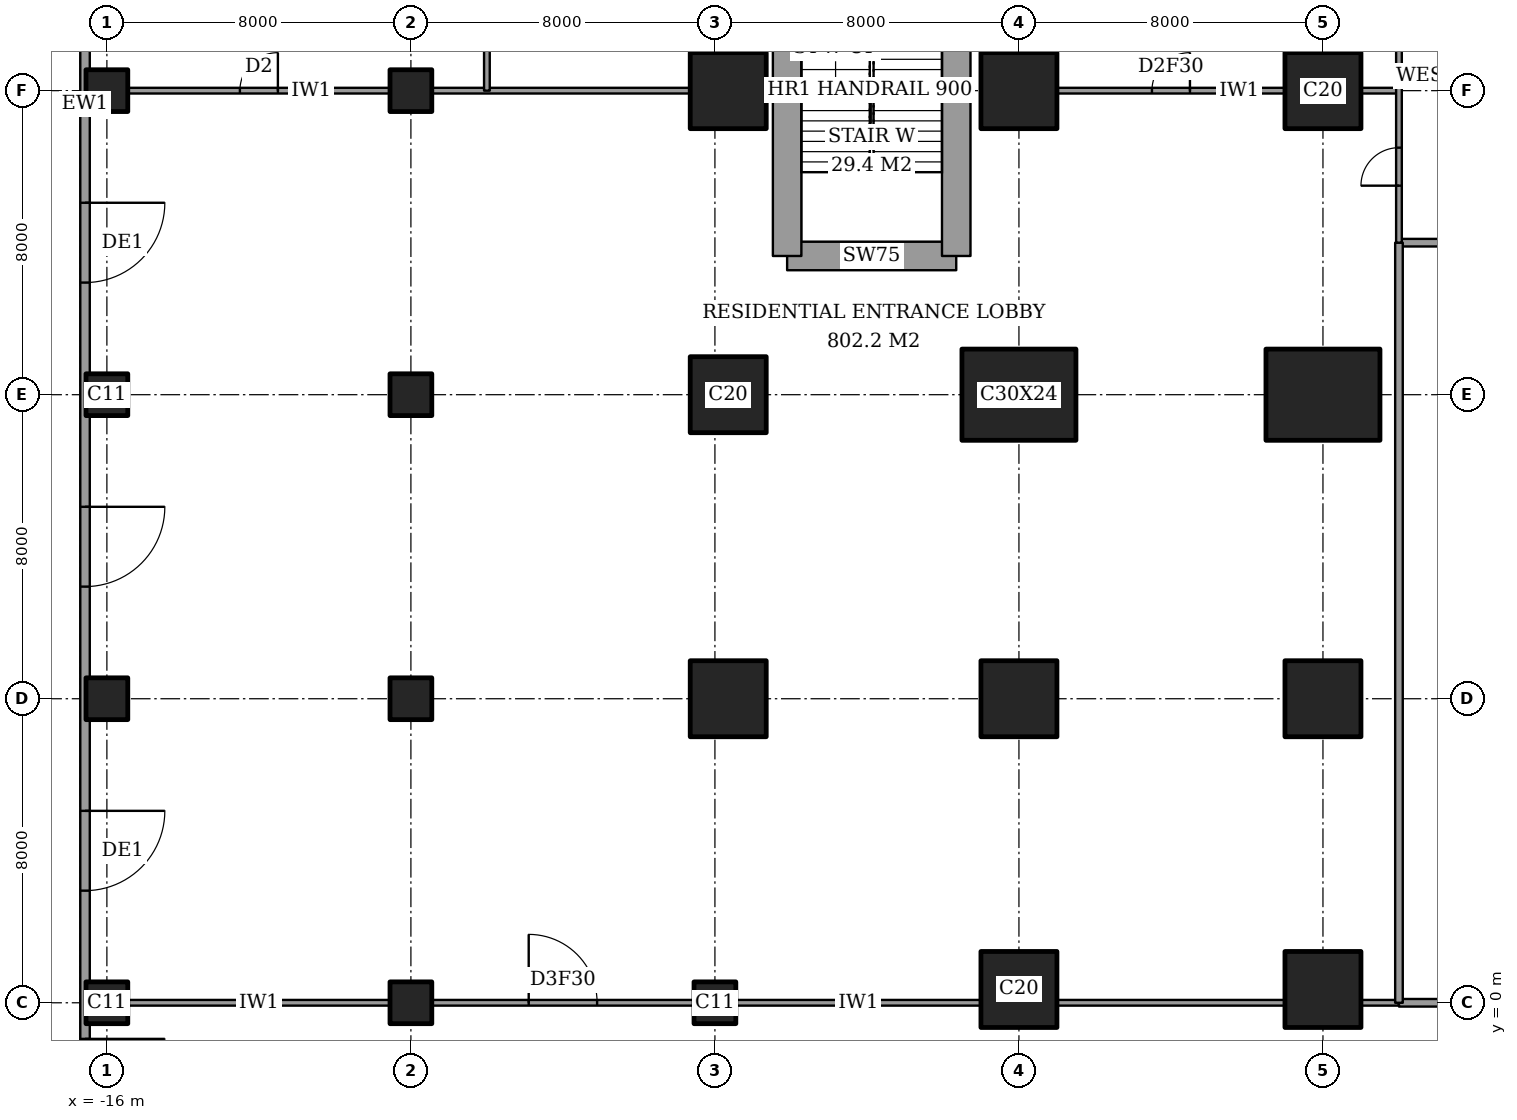
"""IFC4 building model, lengths in metres.
Left out: names, types, materials, properties, quantities, classifications, styles, units other than length and angle.
Written with IfcOpenShell. Run it as: python <this file> out.ifc"""

import sys

from ifc_helpers import new_model, si_unit, direction, frame, frame_2d, origin, origin_2d, place, context, subcontext, project, spatial, rectangle, extrude, element, fill, save


model = new_model("IFC4")
c1 = context("Model", 3, precision=1e-05, world=origin(), true_north=direction((0.0, 1.0)))
c2 = subcontext(c1, "Body", "Model", "MODEL_VIEW")
j1 = project(units=[si_unit("LENGTHUNIT", "METRE"), si_unit("PLANEANGLEUNIT", "RADIAN")], contexts=[c1])
p1 = place(None, origin())
s1 = spatial("IfcSite", under=j1, at=p1, CompositionType="ELEMENT")
p2 = place(p1, origin())
s2 = spatial("IfcBuilding", under=s1, at=p2, CompositionType="ELEMENT")
p3 = place(p2, origin())
s3 = spatial("IfcBuildingStorey", under=s2, at=p3, CompositionType="ELEMENT", Elevation=0.0)
for number, where, z_axis, x_axis in (
    (1, (-16.0, 0.0, 0.0), (0.0, 0.0, 1.0), (1.0, 0.0, 0.0)),
    (2, (-16.0, 8.0, 0.0), (0.0, 0.0, 1.0), (1.0, 0.0, 0.0)),
    (3, (-16.0, 16.0, 0.0), (0.0, 0.0, 1.0), (1.0, 0.0, 0.0)),
    (4, (-16.0, 24.0, 0.0), (0.0, 0.0, 1.0), (1.0, 0.0, 0.0)),
    (5, (-8.0, 0.0, 0.0), (0.0, 0.0, 1.0), (1.0, 0.0, 0.0)),
    (6, (-8.0, 8.0, 0.0), (0.0, 0.0, 1.0), (1.0, 0.0, 0.0)),
    (7, (-8.0, 16.0, 0.0), (0.0, 0.0, 1.0), (1.0, 0.0, 0.0)),
    (8, (-8.0, 24.0, 0.0), (0.0, 0.0, 1.0), (1.0, 0.0, 0.0)),
    (9, (0.0, 0.0, 0.0), (0.0, 0.0, 1.0), (1.0, 0.0, 0.0)),
):
    element("IfcColumn", number, at=place(p3, frame(where, z_axis=z_axis, x_axis=x_axis)), inside=s3, PredefinedType="COLUMN", context=c2, shape_type="SweptSolid", body=[
        extrude(rectangle(XDim=1.1, YDim=1.1, at=origin_2d()), origin(), (0.0, 0.0, 1.0), 6.0),
    ])
for number, where, z_axis, x_axis in (
    (10, (0.35, 8.0, 0.0), (0.0, 0.0, 1.0), (1.0, 0.0, 0.0)),
    (11, (0.35, 16.0, 0.0), (0.0, 0.0, 1.0), (1.0, 0.0, 0.0)),
    (12, (0.35, 24.0, 0.0), (0.0, 0.0, 1.0), (1.0, 0.0, 0.0)),
    (13, (8.0, 0.35, 0.0), (0.0, 0.0, 1.0), (1.0, 0.0, 0.0)),
    (14, (8.0, 8.0, 0.0), (0.0, 0.0, 1.0), (1.0, 0.0, 0.0)),
):
    element("IfcColumn", number, at=place(p3, frame(where, z_axis=z_axis, x_axis=x_axis)), inside=s3, PredefinedType="COLUMN", context=c2, shape_type="SweptSolid", body=[
        extrude(rectangle(XDim=2.0, YDim=2.0, at=origin_2d()), origin(), (0.0, 0.0, 1.0), 6.0),
    ])
p4 = place(p3, frame((8.0, 16.0, 0.0), z_axis=(0.0, 0.0, 1.0), x_axis=(1.0, 0.0, 0.0)))
e15 = element("IfcColumn", 15, at=p4, inside=s3, PredefinedType="COLUMN", context=c2, shape_type="SweptSolid", body=[
    extrude(rectangle(XDim=3.0, YDim=2.4, at=origin_2d()), origin(), (0.0, 0.0, 1.0), 6.0),
])
for number, where, z_axis, x_axis in (
    (16, (8.0, 24.0, 0.0), (0.0, 0.0, 1.0), (1.0, 0.0, 0.0)),
    (17, (16.0, 0.35, 0.0), (0.0, 0.0, 1.0), (1.0, 0.0, 0.0)),
    (18, (16.0, 8.0, 0.0), (0.0, 0.0, 1.0), (1.0, 0.0, 0.0)),
):
    element("IfcColumn", number, at=place(p3, frame(where, z_axis=z_axis, x_axis=x_axis)), inside=s3, PredefinedType="COLUMN", context=c2, shape_type="SweptSolid", body=[
        extrude(rectangle(XDim=2.0, YDim=2.0, at=origin_2d()), origin(), (0.0, 0.0, 1.0), 6.0),
    ])
p5 = place(p3, frame((16.0, 16.0, 0.0), z_axis=(0.0, 0.0, 1.0), x_axis=(1.0, 0.0, 0.0)))
e19 = element("IfcColumn", 19, at=p5, inside=s3, PredefinedType="COLUMN", context=c2, shape_type="SweptSolid", body=[
    extrude(rectangle(XDim=3.0, YDim=2.4, at=origin_2d()), origin(), (0.0, 0.0, 1.0), 6.0),
])
p6 = place(p3, frame((16.0, 24.0, 0.0), z_axis=(0.0, 0.0, 1.0), x_axis=(1.0, 0.0, 0.0)))
e20 = element("IfcColumn", 20, at=p6, inside=s3, PredefinedType="COLUMN", context=c2, shape_type="SweptSolid", body=[
    extrude(rectangle(XDim=2.0, YDim=2.0, at=origin_2d()), origin(), (0.0, 0.0, 1.0), 6.0),
])
p7 = place(p3, frame((1.9, 19.65, 0.0), z_axis=(0.0, 0.0, 1.0), x_axis=(1.0, 0.0, 0.0)))
e21 = element("IfcWall", 21, at=p7, inside=s3, PredefinedType="SHEAR", context=c2, shape_type="SweptSolid", body=[
    extrude(rectangle(XDim=4.45, YDim=0.75, at=frame_2d((2.225, 0.0))), origin(), (0.0, 0.0, 1.0), 6.0),
])
p8 = place(p3, frame((6.35, 19.65, 0.0), z_axis=(0.0, 0.0, 1.0), x_axis=(0.0, 1.0, 0.0)))
e22 = element("IfcWall", 22, at=p8, inside=s3, PredefinedType="SHEAR", context=c2, shape_type="SweptSolid", body=[
    extrude(rectangle(XDim=8.7, YDim=0.75, at=frame_2d((4.35, 0.0))), origin(), (0.0, 0.0, 1.0), 6.0),
])
p9 = place(p8, frame((6.575, 0.0, 0.0)))
e23 = element("IfcOpeningElement", 23, at=p9, cuts=e22, PredefinedType="OPENING", context=c2, shape_type="SweptSolid", body=[
    extrude(rectangle(XDim=1.7, YDim=2.1, at=frame_2d((0.85, 1.05))), frame((0.0, 0.385, 0.0), z_axis=(0.0, -1.0, 0.0), x_axis=(1.0, 0.0, 0.0)), (0.0, 0.0, 1.0), 0.77),
])
p10 = place(p3, frame((1.9, 28.35, 0.0), z_axis=(0.0, 0.0, 1.0), x_axis=(0.0, -1.0, 0.0)))
e24 = element("IfcWall", 24, at=p10, inside=s3, PredefinedType="SHEAR", context=c2, shape_type="SweptSolid", body=[
    extrude(rectangle(XDim=8.7, YDim=0.75, at=frame_2d((4.35, 0.0))), origin(), (0.0, 0.0, 1.0), 6.0),
])
p11 = place(p3, frame((-16.575, 56.575, 0.0), z_axis=(0.0, 0.0, 1.0), x_axis=(0.0, -1.0, 0.0)))
e25 = element("IfcWall", 25, at=p11, inside=s3, PredefinedType="SOLIDWALL", context=c2, shape_type="SweptSolid", body=[
    extrude(rectangle(XDim=73.15, YDim=0.25, at=frame_2d((36.575, 0.0))), origin(), (0.0, 0.0, 1.0), 6.0),
])
p12 = place(p11, frame((1.65, 0.0, 0.3)))
e26 = element("IfcOpeningElement", 26, at=p12, cuts=e25, PredefinedType="OPENING", context=c2, shape_type="SweptSolid", body=[
    extrude(rectangle(XDim=2.4, YDim=3.6, at=frame_2d((1.2, 1.8))), frame((0.0, 0.135, 0.0), z_axis=(0.0, -1.0, 0.0), x_axis=(1.0, 0.0, 0.0)), (0.0, 0.0, 1.0), 0.27),
])
p13 = place(p11, frame((5.1, 0.0, 0.3)))
e27 = element("IfcOpeningElement", 27, at=p13, cuts=e25, PredefinedType="OPENING", context=c2, shape_type="SweptSolid", body=[
    extrude(rectangle(XDim=2.4, YDim=3.6, at=frame_2d((1.2, 1.8))), frame((0.0, 0.135, 0.0), z_axis=(0.0, -1.0, 0.0), x_axis=(1.0, 0.0, 0.0)), (0.0, 0.0, 1.0), 0.27),
])
p14 = place(p11, frame((9.65, 0.0, 0.3)))
e28 = element("IfcOpeningElement", 28, at=p14, cuts=e25, PredefinedType="OPENING", context=c2, shape_type="SweptSolid", body=[
    extrude(rectangle(XDim=2.4, YDim=3.6, at=frame_2d((1.2, 1.8))), frame((0.0, 0.135, 0.0), z_axis=(0.0, -1.0, 0.0), x_axis=(1.0, 0.0, 0.0)), (0.0, 0.0, 1.0), 0.27),
])
p15 = place(p11, frame((19.525, 0.0, 0.0)))
e29 = element("IfcOpeningElement", 29, at=p15, cuts=e25, PredefinedType="OPENING", context=c2, shape_type="SweptSolid", body=[
    extrude(rectangle(XDim=2.1, YDim=2.4, at=frame_2d((1.05, 1.2))), frame((0.0, 0.135, 0.0), z_axis=(0.0, -1.0, 0.0), x_axis=(1.0, 0.0, 0.0)), (0.0, 0.0, 1.0), 0.27),
])
p16 = place(p11, frame((13.1, 0.0, 0.3)))
e30 = element("IfcOpeningElement", 30, at=p16, cuts=e25, PredefinedType="OPENING", context=c2, shape_type="SweptSolid", body=[
    extrude(rectangle(XDim=2.4, YDim=3.6, at=frame_2d((1.2, 1.8))), frame((0.0, 0.135, 0.0), z_axis=(0.0, -1.0, 0.0), x_axis=(1.0, 0.0, 0.0)), (0.0, 0.0, 1.0), 0.27),
])
p17 = place(p11, frame((25.65, 0.0, 0.3)))
e31 = element("IfcOpeningElement", 31, at=p17, cuts=e25, PredefinedType="OPENING", context=c2, shape_type="SweptSolid", body=[
    extrude(rectangle(XDim=2.4, YDim=3.6, at=frame_2d((1.2, 1.8))), frame((0.0, 0.135, 0.0), z_axis=(0.0, -1.0, 0.0), x_axis=(1.0, 0.0, 0.0)), (0.0, 0.0, 1.0), 0.27),
])
p18 = place(p11, frame((29.1, 0.0, 0.3)))
e32 = element("IfcOpeningElement", 32, at=p18, cuts=e25, PredefinedType="OPENING", context=c2, shape_type="SweptSolid", body=[
    extrude(rectangle(XDim=2.4, YDim=3.6, at=frame_2d((1.2, 1.8))), frame((0.0, 0.135, 0.0), z_axis=(0.0, -1.0, 0.0), x_axis=(1.0, 0.0, 0.0)), (0.0, 0.0, 1.0), 0.27),
])
p19 = place(p11, frame((35.525, 0.0, 0.0)))
e33 = element("IfcOpeningElement", 33, at=p19, cuts=e25, PredefinedType="OPENING", context=c2, shape_type="SweptSolid", body=[
    extrude(rectangle(XDim=2.1, YDim=2.4, at=frame_2d((1.05, 1.2))), frame((0.0, 0.135, 0.0), z_axis=(0.0, -1.0, 0.0), x_axis=(1.0, 0.0, 0.0)), (0.0, 0.0, 1.0), 0.27),
])
p20 = place(p11, frame((43.525, 0.0, 0.0)))
e34 = element("IfcOpeningElement", 34, at=p20, cuts=e25, PredefinedType="OPENING", context=c2, shape_type="SweptSolid", body=[
    extrude(rectangle(XDim=2.1, YDim=2.4, at=frame_2d((1.05, 1.2))), frame((0.0, 0.135, 0.0), z_axis=(0.0, -1.0, 0.0), x_axis=(1.0, 0.0, 0.0)), (0.0, 0.0, 1.0), 0.27),
])
p21 = place(p11, frame((51.525, 0.0, 0.0)))
e35 = element("IfcOpeningElement", 35, at=p21, cuts=e25, PredefinedType="OPENING", context=c2, shape_type="SweptSolid", body=[
    extrude(rectangle(XDim=2.1, YDim=2.4, at=frame_2d((1.05, 1.2))), frame((0.0, 0.135, 0.0), z_axis=(0.0, -1.0, 0.0), x_axis=(1.0, 0.0, 0.0)), (0.0, 0.0, 1.0), 0.27),
])
p22 = place(p11, frame((57.525, 0.0, 0.0)))
e36 = element("IfcOpeningElement", 36, at=p22, cuts=e25, PredefinedType="OPENING", context=c2, shape_type="SweptSolid", body=[
    extrude(rectangle(XDim=2.1, YDim=2.4, at=frame_2d((1.05, 1.2))), frame((0.0, 0.135, 0.0), z_axis=(0.0, -1.0, 0.0), x_axis=(1.0, 0.0, 0.0)), (0.0, 0.0, 1.0), 0.27),
])
p23 = place(p11, frame((61.1, 0.0, 0.3)))
e37 = element("IfcOpeningElement", 37, at=p23, cuts=e25, PredefinedType="OPENING", context=c2, shape_type="SweptSolid", body=[
    extrude(rectangle(XDim=2.4, YDim=3.6, at=frame_2d((1.2, 1.8))), frame((0.0, 0.135, 0.0), z_axis=(0.0, -1.0, 0.0), x_axis=(1.0, 0.0, 0.0)), (0.0, 0.0, 1.0), 0.27),
])
p24 = place(p11, frame((65.65, 0.0, 0.3)))
e38 = element("IfcOpeningElement", 38, at=p24, cuts=e25, PredefinedType="OPENING", context=c2, shape_type="SweptSolid", body=[
    extrude(rectangle(XDim=2.4, YDim=3.6, at=frame_2d((1.2, 1.8))), frame((0.0, 0.135, 0.0), z_axis=(0.0, -1.0, 0.0), x_axis=(1.0, 0.0, 0.0)), (0.0, 0.0, 1.0), 0.27),
])
p25 = place(p11, frame((69.1, 0.0, 0.3)))
e39 = element("IfcOpeningElement", 39, at=p25, cuts=e25, PredefinedType="OPENING", context=c2, shape_type="SweptSolid", body=[
    extrude(rectangle(XDim=2.4, YDim=3.6, at=frame_2d((1.2, 1.8))), frame((0.0, 0.135, 0.0), z_axis=(0.0, -1.0, 0.0), x_axis=(1.0, 0.0, 0.0)), (0.0, 0.0, 1.0), 0.27),
])
p26 = place(p3, frame((18.0, 0.0, 0.0), z_axis=(0.0, 0.0, 1.0), x_axis=(1.0, 0.0, 0.0)))
e40 = element("IfcWall", 40, at=p26, inside=s3, PredefinedType="PARTITIONING", context=c2, shape_type="SweptSolid", body=[
    extrude(rectangle(XDim=4.65, YDim=0.2, at=frame_2d((2.325, 0.0))), origin(), (0.0, 0.0, 1.0), 4.3),
])
p27 = place(p3, frame((-15.45, 0.0, 0.0), z_axis=(0.0, 0.0, 1.0), x_axis=(1.0, 0.0, 0.0)))
e41 = element("IfcWall", 41, at=p27, inside=s3, PredefinedType="PARTITIONING", context=c2, shape_type="SweptSolid", body=[
    extrude(rectangle(XDim=6.9, YDim=0.15, at=frame_2d((3.45, 0.0))), origin(), (0.0, 0.0, 1.0), 4.3),
])
p28 = place(p3, frame((-7.45, 0.0, 0.0), z_axis=(0.0, 0.0, 1.0), x_axis=(1.0, 0.0, 0.0)))
e42 = element("IfcWall", 42, at=p28, inside=s3, PredefinedType="PARTITIONING", context=c2, shape_type="SweptSolid", body=[
    extrude(rectangle(XDim=6.9, YDim=0.15, at=frame_2d((3.45, 0.0))), origin(), (0.0, 0.0, 1.0), 4.3),
])
p29 = place(p28, frame((2.55, 0.0, 0.0)))
e43 = element("IfcOpeningElement", 43, at=p29, cuts=e42, PredefinedType="OPENING", context=c2, shape_type="SweptSolid", body=[
    extrude(rectangle(XDim=1.8, YDim=2.1, at=frame_2d((0.9, 1.05))), frame((0.0, 0.085, 0.0), z_axis=(0.0, -1.0, 0.0), x_axis=(1.0, 0.0, 0.0)), (0.0, 0.0, 1.0), 0.17),
])
p30 = place(p3, frame((0.55, 0.0, 0.0), z_axis=(0.0, 0.0, 1.0), x_axis=(1.0, 0.0, 0.0)))
e44 = element("IfcWall", 44, at=p30, inside=s3, PredefinedType="PARTITIONING", context=c2, shape_type="SweptSolid", body=[
    extrude(rectangle(XDim=6.45, YDim=0.15, at=frame_2d((3.225, 0.0))), origin(), (0.0, 0.0, 1.0), 4.3),
])
p31 = place(p3, frame((9.0, 0.0, 0.0), z_axis=(0.0, 0.0, 1.0), x_axis=(1.0, 0.0, 0.0)))
e45 = element("IfcWall", 45, at=p31, inside=s3, PredefinedType="PARTITIONING", context=c2, shape_type="SweptSolid", body=[
    extrude(rectangle(XDim=6.0, YDim=0.15, at=frame_2d((3.0, 0.0))), origin(), (0.0, 0.0, 1.0), 4.3),
])
p32 = place(p3, frame((17.0, 0.0, 0.0), z_axis=(0.0, 0.0, 1.0), x_axis=(1.0, 0.0, 0.0)))
e46 = element("IfcWall", 46, at=p32, inside=s3, PredefinedType="PARTITIONING", context=c2, shape_type="SweptSolid", body=[
    extrude(rectangle(XDim=1.0, YDim=0.15, at=frame_2d((0.5, 0.0))), origin(), (0.0, 0.0, 1.0), 4.3),
])
p33 = place(p3, frame((18.0, 20.0, 0.0), z_axis=(0.0, 0.0, 1.0), x_axis=(1.0, 0.0, 0.0)))
e47 = element("IfcWall", 47, at=p33, inside=s3, PredefinedType="PARTITIONING", context=c2, shape_type="SweptSolid", body=[
    extrude(rectangle(XDim=6.0, YDim=0.2, at=frame_2d((3.0, 0.0))), origin(), (0.0, 0.0, 1.0), 5.7),
])
p34 = place(p3, frame((-15.45, 24.0, 0.0), z_axis=(0.0, 0.0, 1.0), x_axis=(1.0, 0.0, 0.0)))
e48 = element("IfcWall", 48, at=p34, inside=s3, PredefinedType="PARTITIONING", context=c2, shape_type="SweptSolid", body=[
    extrude(rectangle(XDim=6.9, YDim=0.15, at=frame_2d((3.45, 0.0))), origin(), (0.0, 0.0, 1.0), 4.3),
])
p35 = place(p34, frame((2.95, 0.0, 0.0)))
e49 = element("IfcOpeningElement", 49, at=p35, cuts=e48, PredefinedType="OPENING", context=c2, shape_type="SweptSolid", body=[
    extrude(rectangle(XDim=1.0, YDim=2.1, at=frame_2d((0.5, 1.05))), frame((0.0, 0.085, 0.0), z_axis=(0.0, -1.0, 0.0), x_axis=(1.0, 0.0, 0.0)), (0.0, 0.0, 1.0), 0.17),
])
p36 = place(p3, frame((-7.45, 24.0, 0.0), z_axis=(0.0, 0.0, 1.0), x_axis=(1.0, 0.0, 0.0)))
e50 = element("IfcWall", 50, at=p36, inside=s3, PredefinedType="PARTITIONING", context=c2, shape_type="SweptSolid", body=[
    extrude(rectangle(XDim=6.8, YDim=0.15, at=frame_2d((3.4, 0.0))), origin(), (0.0, 0.0, 1.0), 4.3),
])
p37 = place(p3, frame((9.0, 24.0, 0.0), z_axis=(0.0, 0.0, 1.0), x_axis=(1.0, 0.0, 0.0)))
e51 = element("IfcWall", 51, at=p37, inside=s3, PredefinedType="PARTITIONING", context=c2, shape_type="SweptSolid", body=[
    extrude(rectangle(XDim=6.0, YDim=0.15, at=frame_2d((3.0, 0.0))), origin(), (0.0, 0.0, 1.0), 4.3),
])
p38 = place(p37, frame((2.5, 0.0, 0.0)))
e52 = element("IfcOpeningElement", 52, at=p38, cuts=e51, PredefinedType="OPENING", context=c2, shape_type="SweptSolid", body=[
    extrude(rectangle(XDim=1.0, YDim=2.1, at=frame_2d((0.5, 1.05))), frame((0.0, 0.085, 0.0), z_axis=(0.0, -1.0, 0.0), x_axis=(1.0, 0.0, 0.0)), (0.0, 0.0, 1.0), 0.17),
])
p39 = place(p3, frame((17.0, 24.0, 0.0), z_axis=(0.0, 0.0, 1.0), x_axis=(1.0, 0.0, 0.0)))
e53 = element("IfcWall", 53, at=p39, inside=s3, PredefinedType="PARTITIONING", context=c2, shape_type="SweptSolid", body=[
    extrude(rectangle(XDim=1.0, YDim=0.15, at=frame_2d((0.5, 0.0))), origin(), (0.0, 0.0, 1.0), 5.7),
])
p40 = place(p3, frame((-6.0, 24.0, 0.0), z_axis=(0.0, 0.0, 1.0), x_axis=(0.0, 1.0, 0.0)))
e54 = element("IfcWall", 54, at=p40, inside=s3, PredefinedType="PARTITIONING", context=c2, shape_type="SweptSolid", body=[
    extrude(rectangle(XDim=24.25, YDim=0.15, at=frame_2d((12.125, 0.0))), origin(), (0.0, 0.0, 1.0), 5.7),
])
p41 = place(p40, frame((21.675, 0.0, 0.0)))
e55 = element("IfcOpeningElement", 55, at=p41, cuts=e54, PredefinedType="OPENING", context=c2, shape_type="SweptSolid", body=[
    extrude(rectangle(XDim=0.9, YDim=2.1, at=frame_2d((0.45, 1.05))), frame((0.0, 0.085, 0.0), z_axis=(0.0, -1.0, 0.0), x_axis=(1.0, 0.0, 0.0)), (0.0, 0.0, 1.0), 0.17),
])
p42 = place(p3, frame((18.0, 0.0, 0.0), z_axis=(0.0, 0.0, 1.0), x_axis=(0.0, 1.0, 0.0)))
e56 = element("IfcWall", 56, at=p42, inside=s3, PredefinedType="PARTITIONING", context=c2, shape_type="SweptSolid", body=[
    extrude(rectangle(XDim=20.0, YDim=0.2, at=frame_2d((10.0, 0.0))), origin(), (0.0, 0.0, 1.0), 5.7),
])
p43 = place(p3, frame((18.0, 20.0, 0.0), z_axis=(0.0, 0.0, 1.0), x_axis=(0.0, 1.0, 0.0)))
e57 = element("IfcWall", 57, at=p43, inside=s3, PredefinedType="PARTITIONING", context=c2, shape_type="SweptSolid", body=[
    extrude(rectangle(XDim=8.0, YDim=0.15, at=frame_2d((4.0, 0.0))), origin(), (0.0, 0.0, 1.0), 5.7),
])
p44 = place(p43, frame((1.5, 0.0, 0.0)))
e58 = element("IfcOpeningElement", 58, at=p44, cuts=e57, PredefinedType="OPENING", context=c2, shape_type="SweptSolid", body=[
    extrude(rectangle(XDim=1.0, YDim=2.1, at=frame_2d((0.5, 1.05))), frame((0.0, 0.085, 0.0), z_axis=(0.0, -1.0, 0.0), x_axis=(1.0, 0.0, 0.0)), (0.0, 0.0, 1.0), 0.17),
])
p45 = place(p19, origin())
e59 = element("IfcDoor", 59, at=p45, inside=s3, OperationType="DOUBLE_DOOR_DOUBLE_SWING", PredefinedType="DOOR", context=c2, shape_type="SweptSolid", body=[
    extrude(rectangle(XDim=2.1, YDim=2.4, at=frame_2d((1.05, 1.2))), frame((0.0, 0.025, 0.0), z_axis=(0.0, -1.0, 0.0), x_axis=(1.0, 0.0, 0.0)), (0.0, 0.0, 1.0), 0.05),
])
fill(e33, e59)
p46 = place(p20, origin())
e60 = element("IfcDoor", 60, at=p46, inside=s3, OperationType="DOUBLE_DOOR_DOUBLE_SWING", PredefinedType="DOOR", context=c2, shape_type="SweptSolid", body=[
    extrude(rectangle(XDim=2.1, YDim=2.4, at=frame_2d((1.05, 1.2))), frame((0.0, 0.025, 0.0), z_axis=(0.0, -1.0, 0.0), x_axis=(1.0, 0.0, 0.0)), (0.0, 0.0, 1.0), 0.05),
])
fill(e34, e60)
p47 = place(p21, origin())
e61 = element("IfcDoor", 61, at=p47, inside=s3, OperationType="DOUBLE_DOOR_DOUBLE_SWING", PredefinedType="DOOR", context=c2, shape_type="SweptSolid", body=[
    extrude(rectangle(XDim=2.1, YDim=2.4, at=frame_2d((1.05, 1.2))), frame((0.0, 0.025, 0.0), z_axis=(0.0, -1.0, 0.0), x_axis=(1.0, 0.0, 0.0)), (0.0, 0.0, 1.0), 0.05),
])
fill(e35, e61)
p48 = place(p22, origin())
e62 = element("IfcDoor", 62, at=p48, inside=s3, OperationType="DOUBLE_DOOR_DOUBLE_SWING", PredefinedType="DOOR", context=c2, shape_type="SweptSolid", body=[
    extrude(rectangle(XDim=2.1, YDim=2.4, at=frame_2d((1.05, 1.2))), frame((0.0, 0.025, 0.0), z_axis=(0.0, -1.0, 0.0), x_axis=(1.0, 0.0, 0.0)), (0.0, 0.0, 1.0), 0.05),
])
fill(e36, e62)
p49 = place(p44, origin())
e63 = element("IfcDoor", 63, at=p49, inside=s3, OperationType="SINGLE_SWING_RIGHT", PredefinedType="DOOR", context=c2, shape_type="SweptSolid", body=[
    extrude(rectangle(XDim=1.0, YDim=2.1, at=frame_2d((0.5, 1.05))), frame((0.0, 0.025, 0.0), z_axis=(0.0, -1.0, 0.0), x_axis=(1.0, 0.0, 0.0)), (0.0, 0.0, 1.0), 0.05),
])
fill(e58, e63)
p50 = place(p29, origin())
e64 = element("IfcDoor", 64, at=p50, inside=s3, OperationType="DOUBLE_DOOR_DOUBLE_SWING", PredefinedType="DOOR", context=c2, shape_type="SweptSolid", body=[
    extrude(rectangle(XDim=1.8, YDim=2.1, at=frame_2d((0.9, 1.05))), frame((0.0, 0.025, 0.0), z_axis=(0.0, -1.0, 0.0), x_axis=(1.0, 0.0, 0.0)), (0.0, 0.0, 1.0), 0.05),
])
fill(e43, e64)
p51 = place(p35, origin())
e65 = element("IfcDoor", 65, at=p51, inside=s3, OperationType="SINGLE_SWING_LEFT", PredefinedType="DOOR", context=c2, shape_type="SweptSolid", body=[
    extrude(rectangle(XDim=1.0, YDim=2.1, at=frame_2d((0.5, 1.05))), frame((0.0, 0.025, 0.0), z_axis=(0.0, -1.0, 0.0), x_axis=(1.0, 0.0, 0.0)), (0.0, 0.0, 1.0), 0.05),
])
fill(e49, e65)
p52 = place(p38, origin())
e66 = element("IfcDoor", 66, at=p52, inside=s3, OperationType="SINGLE_SWING_LEFT", PredefinedType="DOOR", context=c2, shape_type="SweptSolid", body=[
    extrude(rectangle(XDim=1.0, YDim=2.1, at=frame_2d((0.5, 1.05))), frame((0.0, 0.025, 0.0), z_axis=(0.0, -1.0, 0.0), x_axis=(1.0, 0.0, 0.0)), (0.0, 0.0, 1.0), 0.05),
])
fill(e52, e66)
save(model, sys.argv[1])
